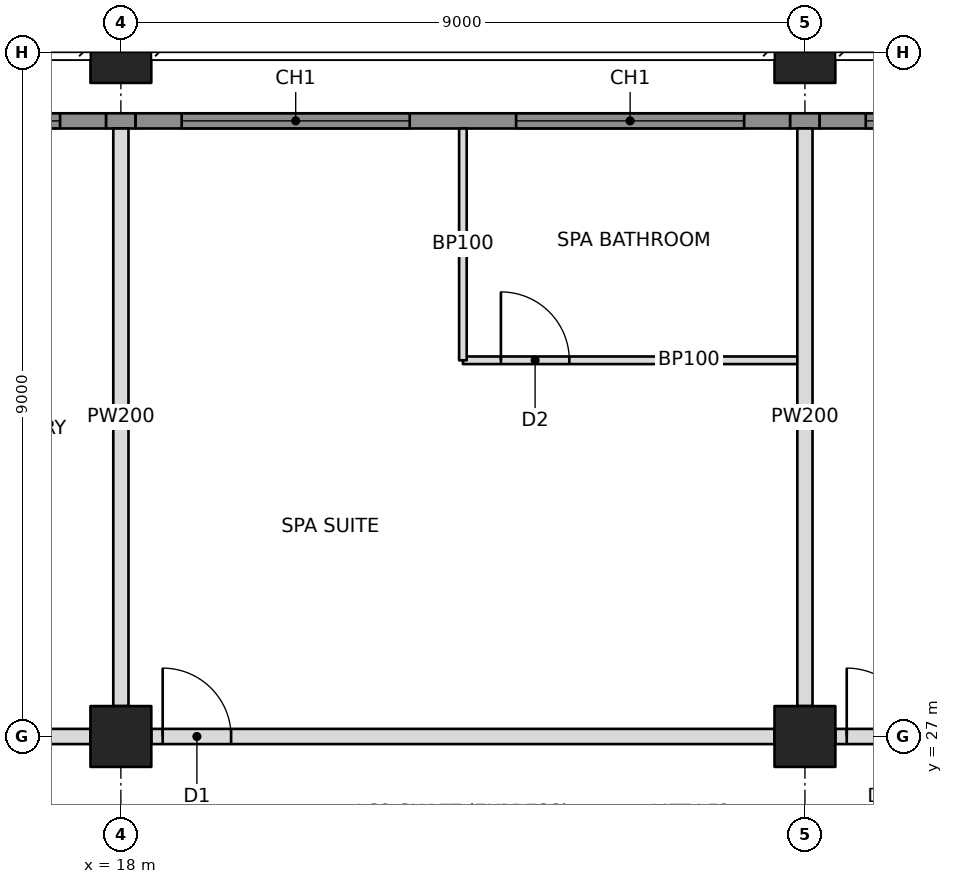
"""IFC4 building model, lengths in metres.
Left out: names, types, materials, properties, quantities, classifications, styles, units other than length and angle.
Written with IfcOpenShell. Run it as: python <this file> out.ifc"""

import sys

from ifc_helpers import new_model, si_unit, direction, frame, frame_2d, origin, origin_2d, place, context, subcontext, project, spatial, rectangle, hollow_rectangle, extrude, element, fill, save


model = new_model("IFC4")
c1 = context("Model", 3, precision=1e-05, world=origin(), true_north=direction((0.0, 1.0)))
c2 = subcontext(c1, "Body", "Model", "MODEL_VIEW")
j1 = project(units=[si_unit("LENGTHUNIT", "METRE"), si_unit("PLANEANGLEUNIT", "RADIAN")], contexts=[c1])
p1 = place(None, origin())
s1 = spatial("IfcSite", under=j1, at=p1, CompositionType="ELEMENT")
p2 = place(p1, origin())
s2 = spatial("IfcBuilding", under=s1, at=p2, CompositionType="ELEMENT")
p3 = place(p2, frame((0.0, 0.0, 82.4)))
s3 = spatial("IfcBuildingStorey", under=s2, at=p3, CompositionType="ELEMENT", Elevation=82.4)
p4 = place(p3, frame((18.0, 27.0, 0.0), z_axis=(0.0, 0.0, 1.0), x_axis=(1.0, 0.0, 0.0)))
e1 = element("IfcColumn", 1, at=p4, inside=s3, PredefinedType="COLUMN", context=c2, shape_type="SweptSolid", body=[
    extrude(hollow_rectangle(XDim=0.8, YDim=0.8, WallThickness=0.09, at=origin_2d()), origin(), (0.0, 0.0, 1.0), 3.4),
])
p5 = place(p3, frame((18.0, 36.0, 0.0), z_axis=(0.0, 0.0, 1.0), x_axis=(1.0, 0.0, 0.0)))
e2 = element("IfcColumn", 2, at=p5, inside=s3, PredefinedType="COLUMN", context=c2, shape_type="SweptSolid", body=[
    extrude(hollow_rectangle(XDim=0.8, YDim=0.8, WallThickness=0.07, at=origin_2d()), origin(), (0.0, 0.0, 1.0), 3.4),
])
p6 = place(p3, frame((27.0, 27.0, 0.0), z_axis=(0.0, 0.0, 1.0), x_axis=(1.0, 0.0, 0.0)))
e3 = element("IfcColumn", 3, at=p6, inside=s3, PredefinedType="COLUMN", context=c2, shape_type="SweptSolid", body=[
    extrude(hollow_rectangle(XDim=0.8, YDim=0.8, WallThickness=0.09, at=origin_2d()), origin(), (0.0, 0.0, 1.0), 3.4),
])
p7 = place(p3, frame((27.0, 36.0, 0.0), z_axis=(0.0, 0.0, 1.0), x_axis=(1.0, 0.0, 0.0)))
e4 = element("IfcColumn", 4, at=p7, inside=s3, PredefinedType="COLUMN", context=c2, shape_type="SweptSolid", body=[
    extrude(hollow_rectangle(XDim=0.8, YDim=0.8, WallThickness=0.07, at=origin_2d()), origin(), (0.0, 0.0, 1.0), 3.4),
])
p8 = place(p3, frame((9.4, 27.0, 0.0), z_axis=(0.0, 0.0, 1.0), x_axis=(1.0, 0.0, 0.0)))
e5 = element("IfcWall", 5, at=p8, inside=s3, PredefinedType="PARTITIONING", context=c2, shape_type="SweptSolid", body=[
    extrude(rectangle(XDim=8.2, YDim=0.2, at=frame_2d((4.1, 0.0))), origin(), (0.0, 0.0, 1.0), 2.405),
])
p9 = place(p8, frame((2.95, 0.0, 0.0)))
e6 = element("IfcOpeningElement", 6, at=p9, cuts=e5, PredefinedType="OPENING", context=c2, shape_type="SweptSolid", body=[
    extrude(rectangle(XDim=0.9, YDim=2.1, at=frame_2d((0.45, 1.05))), frame((0.0, 0.11, 0.0), z_axis=(0.0, -1.0, 0.0), x_axis=(1.0, 0.0, 0.0)), (0.0, 0.0, 1.0), 0.22),
])
p10 = place(p8, frame((4.35, 0.0, 0.0)))
e7 = element("IfcOpeningElement", 7, at=p10, cuts=e5, PredefinedType="OPENING", context=c2, shape_type="SweptSolid", body=[
    extrude(rectangle(XDim=1.0, YDim=2.1, at=frame_2d((0.5, 1.05))), frame((0.0, 0.11, 0.0), z_axis=(0.0, -1.0, 0.0), x_axis=(1.0, 0.0, 0.0)), (0.0, 0.0, 1.0), 0.22),
])
p11 = place(p3, frame((18.4, 27.0, 0.0), z_axis=(0.0, 0.0, 1.0), x_axis=(1.0, 0.0, 0.0)))
e8 = element("IfcWall", 8, at=p11, inside=s3, PredefinedType="PARTITIONING", context=c2, shape_type="SweptSolid", body=[
    extrude(rectangle(XDim=8.2, YDim=0.2, at=frame_2d((4.1, 0.0))), origin(), (0.0, 0.0, 1.0), 2.405),
])
p12 = place(p11, frame((0.15, 0.0, 0.0)))
e9 = element("IfcOpeningElement", 9, at=p12, cuts=e8, PredefinedType="OPENING", context=c2, shape_type="SweptSolid", body=[
    extrude(rectangle(XDim=0.9, YDim=2.1, at=frame_2d((0.45, 1.05))), frame((0.0, 0.11, 0.0), z_axis=(0.0, -1.0, 0.0), x_axis=(1.0, 0.0, 0.0)), (0.0, 0.0, 1.0), 0.22),
])
p13 = place(p3, frame((27.4, 27.0, 0.0), z_axis=(0.0, 0.0, 1.0), x_axis=(1.0, 0.0, 0.0)))
e10 = element("IfcWall", 10, at=p13, inside=s3, PredefinedType="PARTITIONING", context=c2, shape_type="SweptSolid", body=[
    extrude(rectangle(XDim=8.2, YDim=0.2, at=frame_2d((4.1, 0.0))), origin(), (0.0, 0.0, 1.0), 2.405),
])
p14 = place(p13, frame((0.15, 0.0, 0.0)))
e11 = element("IfcOpeningElement", 11, at=p14, cuts=e10, PredefinedType="OPENING", context=c2, shape_type="SweptSolid", body=[
    extrude(rectangle(XDim=0.9, YDim=2.1, at=frame_2d((0.45, 1.05))), frame((0.0, 0.11, 0.0), z_axis=(0.0, -1.0, 0.0), x_axis=(1.0, 0.0, 0.0)), (0.0, 0.0, 1.0), 0.22),
])
for number, where, z_axis, x_axis in (
    (12, (18.0, 27.4, 0.0), (0.0, 0.0, 1.0), (0.0, 1.0, 0.0)),
    (13, (27.0, 27.4, 0.0), (0.0, 0.0, 1.0), (0.0, 1.0, 0.0)),
):
    element("IfcWall", number, at=place(p3, frame(where, z_axis=z_axis, x_axis=x_axis)), inside=s3, PredefinedType="PARTITIONING", context=c2, shape_type="SweptSolid", body=[
        extrude(rectangle(XDim=7.6, YDim=0.2, at=frame_2d((3.8, 0.0))), origin(), (0.0, 0.0, 1.0), 2.405),
    ])
p15 = place(p3, frame((22.5, 31.95, 0.0), z_axis=(0.0, 0.0, 1.0), x_axis=(1.0, 0.0, 0.0)))
e14 = element("IfcWall", 14, at=p15, inside=s3, PredefinedType="PARTITIONING", context=c2, shape_type="SweptSolid", body=[
    extrude(rectangle(XDim=4.4, YDim=0.1, at=frame_2d((2.2, 0.0))), origin(), (0.0, 0.0, 1.0), 2.404),
])
p16 = place(p15, frame((0.5, 0.0, 0.0)))
e15 = element("IfcOpeningElement", 15, at=p16, cuts=e14, PredefinedType="OPENING", context=c2, shape_type="SweptSolid", body=[
    extrude(rectangle(XDim=0.9, YDim=2.1, at=frame_2d((0.45, 1.05))), frame((0.0, 0.06, 0.0), z_axis=(0.0, -1.0, 0.0), x_axis=(1.0, 0.0, 0.0)), (0.0, 0.0, 1.0), 0.12),
])
p17 = place(p3, frame((22.5, 31.95, 0.0), z_axis=(0.0, 0.0, 1.0), x_axis=(0.0, 1.0, 0.0)))
e16 = element("IfcWall", 16, at=p17, inside=s3, PredefinedType="PARTITIONING", context=c2, shape_type="SweptSolid", body=[
    extrude(rectangle(XDim=3.05, YDim=0.1, at=frame_2d((1.525, 0.0))), origin(), (0.0, 0.0, 1.0), 3.2),
])
p18 = place(p3, frame((9.135, 35.1, 0.0), z_axis=(0.0, 0.0, 1.0), x_axis=(1.0, 0.0, 0.0)))
e17 = element("IfcWall", 17, at=p18, inside=s3, PredefinedType="SOLIDWALL", context=c2, shape_type="SweptSolid", body=[
    extrude(rectangle(XDim=8.671, YDim=0.2, at=frame_2d((4.335, 0.0))), origin(), (0.0, 0.0, 1.0), 3.2),
])
p19 = place(p18, frame((0.665, 0.0, 0.6)))
e18 = element("IfcOpeningElement", 18, at=p19, cuts=e17, PredefinedType="OPENING", context=c2, shape_type="SweptSolid", body=[
    extrude(rectangle(XDim=3.0, YDim=2.2, at=frame_2d((1.5, 1.1))), frame((0.0, 0.11, 0.0), z_axis=(0.0, -1.0, 0.0), x_axis=(1.0, 0.0, 0.0)), (0.0, 0.0, 1.0), 0.22),
])
p20 = place(p18, frame((5.065, 0.0, 0.6)))
e19 = element("IfcOpeningElement", 19, at=p20, cuts=e17, PredefinedType="OPENING", context=c2, shape_type="SweptSolid", body=[
    extrude(rectangle(XDim=3.0, YDim=2.2, at=frame_2d((1.5, 1.1))), frame((0.0, 0.11, 0.0), z_axis=(0.0, -1.0, 0.0), x_axis=(1.0, 0.0, 0.0)), (0.0, 0.0, 1.0), 0.22),
])
p21 = place(p3, frame((17.806, 35.1, 0.0), z_axis=(0.0, 0.0, 1.0), x_axis=(1.0, 0.0, 0.0)))
e20 = element("IfcWall", 20, at=p21, inside=s3, PredefinedType="SOLIDWALL", context=c2, shape_type="SweptSolid", body=[
    extrude(rectangle(XDim=0.388, YDim=0.2, at=frame_2d((0.194, 0.0))), origin(), (0.0, 0.0, 1.0), 2.404),
])
p22 = place(p3, frame((18.194, 35.1, 0.0), z_axis=(0.0, 0.0, 1.0), x_axis=(1.0, 0.0, 0.0)))
e21 = element("IfcWall", 21, at=p22, inside=s3, PredefinedType="SOLIDWALL", context=c2, shape_type="SweptSolid", body=[
    extrude(rectangle(XDim=8.612, YDim=0.2, at=frame_2d((4.306, 0.0))), origin(), (0.0, 0.0, 1.0), 3.2),
])
p23 = place(p22, frame((0.606, 0.0, 0.6)))
e22 = element("IfcOpeningElement", 22, at=p23, cuts=e21, PredefinedType="OPENING", context=c2, shape_type="SweptSolid", body=[
    extrude(rectangle(XDim=3.0, YDim=2.2, at=frame_2d((1.5, 1.1))), frame((0.0, 0.11, 0.0), z_axis=(0.0, -1.0, 0.0), x_axis=(1.0, 0.0, 0.0)), (0.0, 0.0, 1.0), 0.22),
])
p24 = place(p22, frame((5.006, 0.0, 0.6)))
e23 = element("IfcOpeningElement", 23, at=p24, cuts=e21, PredefinedType="OPENING", context=c2, shape_type="SweptSolid", body=[
    extrude(rectangle(XDim=3.0, YDim=2.2, at=frame_2d((1.5, 1.1))), frame((0.0, 0.11, 0.0), z_axis=(0.0, -1.0, 0.0), x_axis=(1.0, 0.0, 0.0)), (0.0, 0.0, 1.0), 0.22),
])
p25 = place(p3, frame((26.806, 35.1, 0.0), z_axis=(0.0, 0.0, 1.0), x_axis=(1.0, 0.0, 0.0)))
e24 = element("IfcWall", 24, at=p25, inside=s3, PredefinedType="SOLIDWALL", context=c2, shape_type="SweptSolid", body=[
    extrude(rectangle(XDim=0.388, YDim=0.2, at=frame_2d((0.194, 0.0))), origin(), (0.0, 0.0, 1.0), 2.404),
])
p26 = place(p3, frame((27.194, 35.1, 0.0), z_axis=(0.0, 0.0, 1.0), x_axis=(1.0, 0.0, 0.0)))
e25 = element("IfcWall", 25, at=p26, inside=s3, PredefinedType="SOLIDWALL", context=c2, shape_type="SweptSolid", body=[
    extrude(rectangle(XDim=8.671, YDim=0.2, at=frame_2d((4.335, 0.0))), origin(), (0.0, 0.0, 1.0), 3.2),
])
p27 = place(p26, frame((0.606, 0.0, 0.6)))
e26 = element("IfcOpeningElement", 26, at=p27, cuts=e25, PredefinedType="OPENING", context=c2, shape_type="SweptSolid", body=[
    extrude(rectangle(XDim=3.0, YDim=2.2, at=frame_2d((1.5, 1.1))), frame((0.0, 0.11, 0.0), z_axis=(0.0, -1.0, 0.0), x_axis=(1.0, 0.0, 0.0)), (0.0, 0.0, 1.0), 0.22),
])
p28 = place(p26, frame((5.006, 0.0, 0.6)))
e27 = element("IfcOpeningElement", 27, at=p28, cuts=e25, PredefinedType="OPENING", context=c2, shape_type="SweptSolid", body=[
    extrude(rectangle(XDim=3.0, YDim=2.2, at=frame_2d((1.5, 1.1))), frame((0.0, 0.11, 0.0), z_axis=(0.0, -1.0, 0.0), x_axis=(1.0, 0.0, 0.0)), (0.0, 0.0, 1.0), 0.22),
])
p29 = place(p20, origin())
e28 = element("IfcWindow", 28, at=p29, inside=s3, PartitioningType="TRIPLE_PANEL_VERTICAL", PredefinedType="WINDOW", context=c2, shape_type="SweptSolid", body=[
    extrude(rectangle(XDim=3.0, YDim=2.2, at=frame_2d((1.5, 1.1))), frame((0.0, 0.03, 0.0), z_axis=(0.0, -1.0, 0.0), x_axis=(1.0, 0.0, 0.0)), (0.0, 0.0, 1.0), 0.06),
])
fill(e19, e28)
p30 = place(p23, origin())
e29 = element("IfcWindow", 29, at=p30, inside=s3, PartitioningType="TRIPLE_PANEL_VERTICAL", PredefinedType="WINDOW", context=c2, shape_type="SweptSolid", body=[
    extrude(rectangle(XDim=3.0, YDim=2.2, at=frame_2d((1.5, 1.1))), frame((0.0, 0.03, 0.0), z_axis=(0.0, -1.0, 0.0), x_axis=(1.0, 0.0, 0.0)), (0.0, 0.0, 1.0), 0.06),
])
fill(e22, e29)
p31 = place(p24, origin())
e30 = element("IfcWindow", 30, at=p31, inside=s3, PartitioningType="TRIPLE_PANEL_VERTICAL", PredefinedType="WINDOW", context=c2, shape_type="SweptSolid", body=[
    extrude(rectangle(XDim=3.0, YDim=2.2, at=frame_2d((1.5, 1.1))), frame((0.0, 0.03, 0.0), z_axis=(0.0, -1.0, 0.0), x_axis=(1.0, 0.0, 0.0)), (0.0, 0.0, 1.0), 0.06),
])
fill(e23, e30)
p32 = place(p27, origin())
e31 = element("IfcWindow", 31, at=p32, inside=s3, PartitioningType="TRIPLE_PANEL_VERTICAL", PredefinedType="WINDOW", context=c2, shape_type="SweptSolid", body=[
    extrude(rectangle(XDim=3.0, YDim=2.2, at=frame_2d((1.5, 1.1))), frame((0.0, 0.03, 0.0), z_axis=(0.0, -1.0, 0.0), x_axis=(1.0, 0.0, 0.0)), (0.0, 0.0, 1.0), 0.06),
])
fill(e26, e31)
p33 = place(p16, origin())
e32 = element("IfcDoor", 32, at=p33, inside=s3, OperationType="SINGLE_SWING_LEFT", PredefinedType="DOOR", context=c2, shape_type="SweptSolid", body=[
    extrude(rectangle(XDim=0.9, YDim=2.1, at=frame_2d((0.45, 1.05))), frame((0.0, 0.025, 0.0), z_axis=(0.0, -1.0, 0.0), x_axis=(1.0, 0.0, 0.0)), (0.0, 0.0, 1.0), 0.05),
])
fill(e15, e32)
p34 = place(p12, origin())
e33 = element("IfcDoor", 33, at=p34, inside=s3, OperationType="SINGLE_SWING_LEFT", PredefinedType="DOOR", context=c2, shape_type="SweptSolid", body=[
    extrude(rectangle(XDim=0.9, YDim=2.1, at=frame_2d((0.45, 1.05))), frame((0.0, 0.025, 0.0), z_axis=(0.0, -1.0, 0.0), x_axis=(1.0, 0.0, 0.0)), (0.0, 0.0, 1.0), 0.05),
])
fill(e9, e33)
p35 = place(p14, origin())
e34 = element("IfcDoor", 34, at=p35, inside=s3, OperationType="SINGLE_SWING_LEFT", PredefinedType="DOOR", context=c2, shape_type="SweptSolid", body=[
    extrude(rectangle(XDim=0.9, YDim=2.1, at=frame_2d((0.45, 1.05))), frame((0.0, 0.025, 0.0), z_axis=(0.0, -1.0, 0.0), x_axis=(1.0, 0.0, 0.0)), (0.0, 0.0, 1.0), 0.05),
])
fill(e11, e34)
save(model, sys.argv[1])
